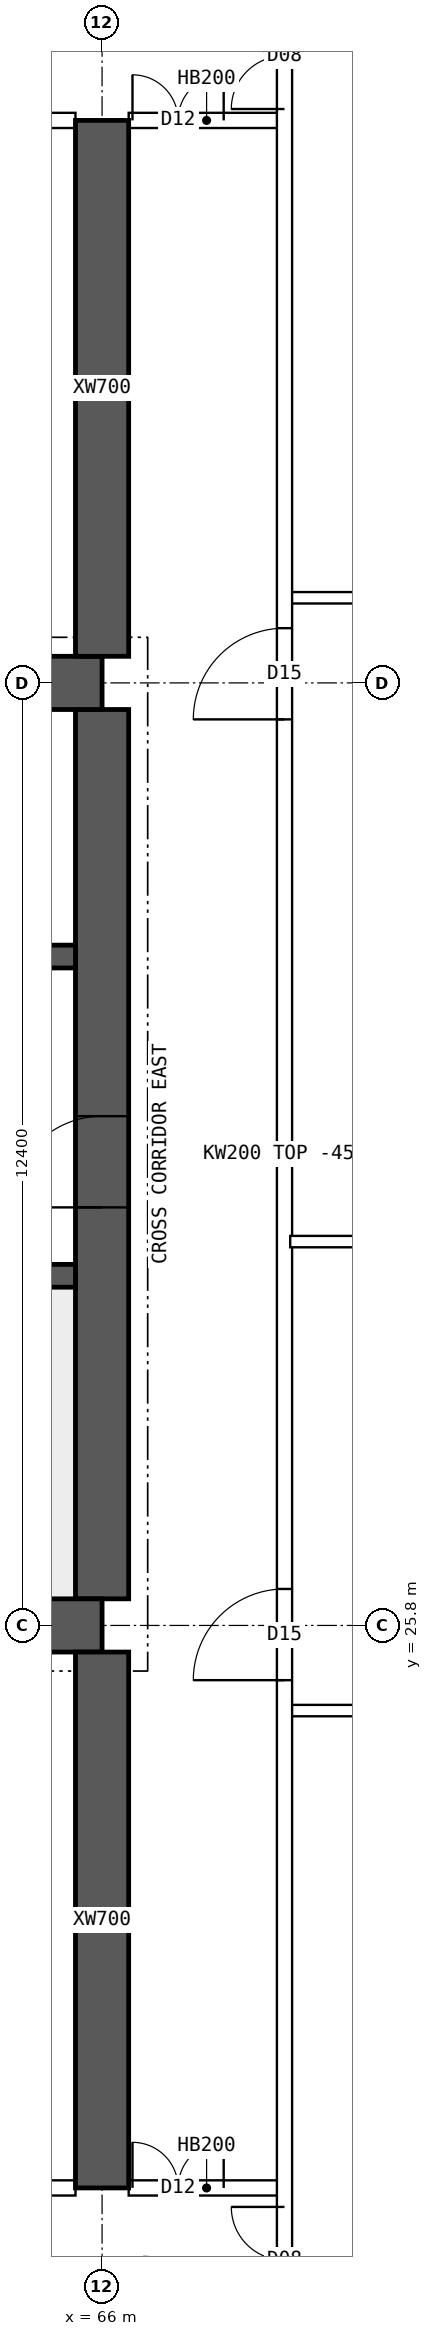
"""IFC4 building model, lengths in metres.
Left out: names, types, materials, properties, quantities, classifications, styles, units other than length and angle.
Written with IfcOpenShell. Run it as: python <this file> out.ifc"""

import sys

from ifc_helpers import new_model, si_unit, direction, frame, frame_2d, origin, place, context, subcontext, project, spatial, polyline, rectangle, outline, extrude, element, fill, save


model = new_model("IFC4")
c1 = context("Model", 3, precision=1e-05, world=origin(), true_north=direction((0.0, 1.0)))
c2 = subcontext(c1, "Body", "Model", "MODEL_VIEW")
j1 = project(units=[si_unit("LENGTHUNIT", "METRE"), si_unit("PLANEANGLEUNIT", "RADIAN")], contexts=[c1])
p1 = place(None, origin())
s1 = spatial("IfcSite", under=j1, at=p1, CompositionType="ELEMENT")
p2 = place(p1, origin())
s2 = spatial("IfcBuilding", under=s1, at=p2, CompositionType="ELEMENT")
p3 = place(p2, frame((0.0, 0.0, 212.8)))
s3 = spatial("IfcBuildingStorey", under=s2, at=p3, CompositionType="ELEMENT", Elevation=212.8)
for number, where, z_axis, x_axis in (
    (1, (18.0, 25.8, 0.0), (0.0, 0.0, 1.0), (1.0, 0.0, 0.0)),
    (2, (18.0, 38.2, 0.0), (0.0, 0.0, 1.0), (1.0, 0.0, 0.0)),
):
    element("IfcWall", number, at=place(p3, frame(where, z_axis=z_axis, x_axis=x_axis)), inside=s3, PredefinedType="SHEAR", context=c2, shape_type="SweptSolid", body=[
        extrude(rectangle(XDim=48.0, YDim=0.7, at=frame_2d((24.0, 0.0))), origin(), (0.0, 0.0, 1.0), 3.75),
    ])
p4 = place(p3, frame((66.0, 26.15, 0.0), z_axis=(0.0, 0.0, 1.0), x_axis=(0.0, 1.0, 0.0)))
e3 = element("IfcWall", 3, at=p4, inside=s3, PredefinedType="SHEAR", context=c2, shape_type="SweptSolid", body=[
    extrude(rectangle(XDim=11.7, YDim=0.7, at=frame_2d((5.85, 0.0))), origin(), (0.0, 0.0, 1.0), 3.75),
])
p5 = place(p4, frame((5.15, 0.0, 0.0)))
e4 = element("IfcOpeningElement", 4, at=p5, cuts=e3, PredefinedType="OPENING", context=c2, shape_type="SweptSolid", body=[
    extrude(rectangle(XDim=1.2, YDim=2.1, at=frame_2d((0.6, 1.05))), frame((0.0, 0.36, 0.0), z_axis=(0.0, -1.0, 0.0), x_axis=(1.0, 0.0, 0.0)), (0.0, 0.0, 1.0), 0.72),
])
p6 = place(p3, frame((18.35, 30.4, 0.0), z_axis=(0.0, 0.0, 1.0), x_axis=(1.0, 0.0, 0.0)))
e5 = element("IfcWall", 5, at=p6, inside=s3, PredefinedType="SHEAR", context=c2, shape_type="SweptSolid", body=[
    extrude(rectangle(XDim=47.3, YDim=0.3, at=frame_2d((23.65, 0.0))), origin(), (0.0, 0.0, 1.0), 3.75),
])
p7 = place(p6, frame((0.4, 0.0, 0.0)))
e6 = element("IfcOpeningElement", 6, at=p7, cuts=e5, PredefinedType="OPENING", context=c2, shape_type="SweptSolid", body=[
    extrude(rectangle(XDim=1.0, YDim=2.1, at=frame_2d((0.5, 1.05))), frame((0.0, 0.16, 0.0), z_axis=(0.0, -1.0, 0.0), x_axis=(1.0, 0.0, 0.0)), (0.0, 0.0, 1.0), 0.32),
])
p8 = place(p6, frame((45.9, 0.0, 0.0)))
e7 = element("IfcOpeningElement", 7, at=p8, cuts=e5, PredefinedType="OPENING", context=c2, shape_type="SweptSolid", body=[
    extrude(rectangle(XDim=1.0, YDim=2.1, at=frame_2d((0.5, 1.05))), frame((0.0, 0.16, 0.0), z_axis=(0.0, -1.0, 0.0), x_axis=(1.0, 0.0, 0.0)), (0.0, 0.0, 1.0), 0.32),
])
p9 = place(p6, frame((8.4, 0.0, 0.0)))
e8 = element("IfcOpeningElement", 8, at=p9, cuts=e5, PredefinedType="OPENING", context=c2, shape_type="SweptSolid", body=[
    extrude(rectangle(XDim=1.1, YDim=2.1, at=frame_2d((0.55, 1.05))), frame((0.0, 0.16, 0.0), z_axis=(0.0, -1.0, 0.0), x_axis=(1.0, 0.0, 0.0)), (0.0, 0.0, 1.0), 0.32),
])
p10 = place(p6, frame((11.0, 0.0, 0.0)))
e9 = element("IfcOpeningElement", 9, at=p10, cuts=e5, PredefinedType="OPENING", context=c2, shape_type="SweptSolid", body=[
    extrude(rectangle(XDim=1.1, YDim=2.1, at=frame_2d((0.55, 1.05))), frame((0.0, 0.16, 0.0), z_axis=(0.0, -1.0, 0.0), x_axis=(1.0, 0.0, 0.0)), (0.0, 0.0, 1.0), 0.32),
])
p11 = place(p6, frame((13.6, 0.0, 0.0)))
e10 = element("IfcOpeningElement", 10, at=p11, cuts=e5, PredefinedType="OPENING", context=c2, shape_type="SweptSolid", body=[
    extrude(rectangle(XDim=1.1, YDim=2.1, at=frame_2d((0.55, 1.05))), frame((0.0, 0.16, 0.0), z_axis=(0.0, -1.0, 0.0), x_axis=(1.0, 0.0, 0.0)), (0.0, 0.0, 1.0), 0.32),
])
p12 = place(p6, frame((16.2, 0.0, 0.0)))
e11 = element("IfcOpeningElement", 11, at=p12, cuts=e5, PredefinedType="OPENING", context=c2, shape_type="SweptSolid", body=[
    extrude(rectangle(XDim=1.1, YDim=2.1, at=frame_2d((0.55, 1.05))), frame((0.0, 0.16, 0.0), z_axis=(0.0, -1.0, 0.0), x_axis=(1.0, 0.0, 0.0)), (0.0, 0.0, 1.0), 0.32),
])
p13 = place(p6, frame((18.975, 0.0, 0.0)))
e12 = element("IfcOpeningElement", 12, at=p13, cuts=e5, PredefinedType="OPENING", context=c2, shape_type="SweptSolid", body=[
    extrude(rectangle(XDim=0.9, YDim=2.1, at=frame_2d((0.45, 1.05))), frame((0.0, 0.16, 0.0), z_axis=(0.0, -1.0, 0.0), x_axis=(1.0, 0.0, 0.0)), (0.0, 0.0, 1.0), 0.32),
])
p14 = place(p6, frame((30.267, 0.0, 0.0)))
e13 = element("IfcOpeningElement", 13, at=p14, cuts=e5, PredefinedType="OPENING", context=c2, shape_type="SweptSolid", body=[
    extrude(rectangle(XDim=1.1, YDim=2.1, at=frame_2d((0.55, 1.05))), frame((0.0, 0.16, 0.0), z_axis=(0.0, -1.0, 0.0), x_axis=(1.0, 0.0, 0.0)), (0.0, 0.0, 1.0), 0.32),
])
p15 = place(p6, frame((33.8, 0.0, 0.0)))
e14 = element("IfcOpeningElement", 14, at=p15, cuts=e5, PredefinedType="OPENING", context=c2, shape_type="SweptSolid", body=[
    extrude(rectangle(XDim=1.1, YDim=2.1, at=frame_2d((0.55, 1.05))), frame((0.0, 0.16, 0.0), z_axis=(0.0, -1.0, 0.0), x_axis=(1.0, 0.0, 0.0)), (0.0, 0.0, 1.0), 0.32),
])
p16 = place(p6, frame((37.333, 0.0, 0.0)))
e15 = element("IfcOpeningElement", 15, at=p16, cuts=e5, PredefinedType="OPENING", context=c2, shape_type="SweptSolid", body=[
    extrude(rectangle(XDim=1.1, YDim=2.1, at=frame_2d((0.55, 1.05))), frame((0.0, 0.16, 0.0), z_axis=(0.0, -1.0, 0.0), x_axis=(1.0, 0.0, 0.0)), (0.0, 0.0, 1.0), 0.32),
])
p17 = place(p3, frame((18.35, 34.6, 0.0), z_axis=(0.0, 0.0, 1.0), x_axis=(1.0, 0.0, 0.0)))
e16 = element("IfcWall", 16, at=p17, inside=s3, PredefinedType="SHEAR", context=c2, shape_type="SweptSolid", body=[
    extrude(rectangle(XDim=47.3, YDim=0.3, at=frame_2d((23.65, 0.0))), origin(), (0.0, 0.0, 1.0), 3.75),
])
p18 = place(p17, frame((0.9, 0.0, 0.0)))
e17 = element("IfcOpeningElement", 17, at=p18, cuts=e16, PredefinedType="OPENING", context=c2, shape_type="SweptSolid", body=[
    extrude(rectangle(XDim=1.1, YDim=2.1, at=frame_2d((0.55, 1.05))), frame((0.0, 0.16, 0.0), z_axis=(0.0, -1.0, 0.0), x_axis=(1.0, 0.0, 0.0)), (0.0, 0.0, 1.0), 0.32),
])
p19 = place(p17, frame((45.3, 0.0, 0.0)))
e18 = element("IfcOpeningElement", 18, at=p19, cuts=e16, PredefinedType="OPENING", context=c2, shape_type="SweptSolid", body=[
    extrude(rectangle(XDim=1.1, YDim=2.1, at=frame_2d((0.55, 1.05))), frame((0.0, 0.16, 0.0), z_axis=(0.0, -1.0, 0.0), x_axis=(1.0, 0.0, 0.0)), (0.0, 0.0, 1.0), 0.32),
])
p20 = place(p17, frame((4.25, 0.0, 0.0)))
e19 = element("IfcOpeningElement", 19, at=p20, cuts=e16, PredefinedType="OPENING", context=c2, shape_type="SweptSolid", body=[
    extrude(rectangle(XDim=0.9, YDim=2.1, at=frame_2d((0.45, 1.05))), frame((0.0, 0.16, 0.0), z_axis=(0.0, -1.0, 0.0), x_axis=(1.0, 0.0, 0.0)), (0.0, 0.0, 1.0), 0.32),
])
p21 = place(p17, frame((42.15, 0.0, 0.0)))
e20 = element("IfcOpeningElement", 20, at=p21, cuts=e16, PredefinedType="OPENING", context=c2, shape_type="SweptSolid", body=[
    extrude(rectangle(XDim=0.9, YDim=2.1, at=frame_2d((0.45, 1.05))), frame((0.0, 0.16, 0.0), z_axis=(0.0, -1.0, 0.0), x_axis=(1.0, 0.0, 0.0)), (0.0, 0.0, 1.0), 0.32),
])
p22 = place(p17, frame((9.025, 0.0, 0.0)))
e21 = element("IfcOpeningElement", 21, at=p22, cuts=e16, PredefinedType="OPENING", context=c2, shape_type="SweptSolid", body=[
    extrude(rectangle(XDim=0.9, YDim=2.1, at=frame_2d((0.45, 1.05))), frame((0.0, 0.16, 0.0), z_axis=(0.0, -1.0, 0.0), x_axis=(1.0, 0.0, 0.0)), (0.0, 0.0, 1.0), 0.32),
])
p23 = place(p17, frame((12.999, 0.0, 0.0)))
e22 = element("IfcOpeningElement", 22, at=p23, cuts=e16, PredefinedType="OPENING", context=c2, shape_type="SweptSolid", body=[
    extrude(rectangle(XDim=0.9, YDim=2.1, at=frame_2d((0.45, 1.05))), frame((0.0, 0.16, 0.0), z_axis=(0.0, -1.0, 0.0), x_axis=(1.0, 0.0, 0.0)), (0.0, 0.0, 1.0), 0.32),
])
p24 = place(p17, frame((16.646, 0.0, 0.0)))
e23 = element("IfcOpeningElement", 23, at=p24, cuts=e16, PredefinedType="OPENING", context=c2, shape_type="SweptSolid", body=[
    extrude(rectangle(XDim=0.9, YDim=2.1, at=frame_2d((0.45, 1.05))), frame((0.0, 0.16, 0.0), z_axis=(0.0, -1.0, 0.0), x_axis=(1.0, 0.0, 0.0)), (0.0, 0.0, 1.0), 0.32),
])
p25 = place(p17, frame((20.405, 0.0, 0.0)))
e24 = element("IfcOpeningElement", 24, at=p25, cuts=e16, PredefinedType="OPENING", context=c2, shape_type="SweptSolid", body=[
    extrude(rectangle(XDim=0.9, YDim=2.1, at=frame_2d((0.45, 1.05))), frame((0.0, 0.16, 0.0), z_axis=(0.0, -1.0, 0.0), x_axis=(1.0, 0.0, 0.0)), (0.0, 0.0, 1.0), 0.32),
])
p26 = place(p17, frame((24.811, 0.0, 0.0)))
e25 = element("IfcOpeningElement", 25, at=p26, cuts=e16, PredefinedType="OPENING", context=c2, shape_type="SweptSolid", body=[
    extrude(rectangle(XDim=0.9, YDim=2.1, at=frame_2d((0.45, 1.05))), frame((0.0, 0.16, 0.0), z_axis=(0.0, -1.0, 0.0), x_axis=(1.0, 0.0, 0.0)), (0.0, 0.0, 1.0), 0.32),
])
p27 = place(p17, frame((27.608, 0.0, 0.0)))
e26 = element("IfcOpeningElement", 26, at=p27, cuts=e16, PredefinedType="OPENING", context=c2, shape_type="SweptSolid", body=[
    extrude(rectangle(XDim=0.9, YDim=2.1, at=frame_2d((0.45, 1.05))), frame((0.0, 0.16, 0.0), z_axis=(0.0, -1.0, 0.0), x_axis=(1.0, 0.0, 0.0)), (0.0, 0.0, 1.0), 0.32),
])
p28 = place(p17, frame((29.981, 0.0, 0.0)))
e27 = element("IfcOpeningElement", 27, at=p28, cuts=e16, PredefinedType="OPENING", context=c2, shape_type="SweptSolid", body=[
    extrude(rectangle(XDim=0.9, YDim=2.1, at=frame_2d((0.45, 1.05))), frame((0.0, 0.16, 0.0), z_axis=(0.0, -1.0, 0.0), x_axis=(1.0, 0.0, 0.0)), (0.0, 0.0, 1.0), 0.32),
])
p29 = place(p17, frame((33.831, 0.0, 0.0)))
e28 = element("IfcOpeningElement", 28, at=p29, cuts=e16, PredefinedType="OPENING", context=c2, shape_type="SweptSolid", body=[
    extrude(rectangle(XDim=0.9, YDim=2.1, at=frame_2d((0.45, 1.05))), frame((0.0, 0.16, 0.0), z_axis=(0.0, -1.0, 0.0), x_axis=(1.0, 0.0, 0.0)), (0.0, 0.0, 1.0), 0.32),
])
p30 = place(p17, frame((37.579, 0.0, 0.0)))
e29 = element("IfcOpeningElement", 29, at=p30, cuts=e16, PredefinedType="OPENING", context=c2, shape_type="SweptSolid", body=[
    extrude(rectangle(XDim=0.9, YDim=2.1, at=frame_2d((0.45, 1.05))), frame((0.0, 0.16, 0.0), z_axis=(0.0, -1.0, 0.0), x_axis=(1.0, 0.0, 0.0)), (0.0, 0.0, 1.0), 0.32),
])
for number, where, z_axis, x_axis in (
    (30, (66.0, 18.4, 0.0), (0.0, 0.0, 1.0), (0.0, 1.0, 0.0)),
    (31, (66.0, 38.55, 0.0), (0.0, 0.0, 1.0), (0.0, 1.0, 0.0)),
):
    element("IfcWall", number, at=place(p3, frame(where, z_axis=z_axis, x_axis=x_axis)), inside=s3, PredefinedType="SHEAR", context=c2, shape_type="SweptSolid", body=[
        extrude(rectangle(XDim=7.05, YDim=0.7, at=frame_2d((3.525, 0.0))), origin(), (0.0, 0.0, 1.0), 3.75),
    ])
p31 = place(p3, frame((60.35, 18.4, 0.0), z_axis=(0.0, 0.0, 1.0), x_axis=(1.0, 0.0, 0.0)))
e32 = element("IfcWall", 32, at=p31, inside=s3, PredefinedType="SOLIDWALL", context=c2, shape_type="SweptSolid", body=[
    extrude(rectangle(XDim=5.3, YDim=0.2, at=frame_2d((2.65, 0.0))), origin(), (0.0, 0.0, 1.0), 3.3),
])
p32 = place(p31, frame((0.15, 0.0, 0.0)))
e33 = element("IfcOpeningElement", 33, at=p32, cuts=e32, PredefinedType="OPENING", context=c2, shape_type="SweptSolid", body=[
    extrude(rectangle(XDim=0.9, YDim=2.1, at=frame_2d((0.45, 1.05))), frame((0.0, 0.11, 0.0), z_axis=(0.0, -1.0, 0.0), x_axis=(1.0, 0.0, 0.0)), (0.0, 0.0, 1.0), 0.22),
])
p33 = place(p31, frame((2.29, 0.0, 0.0)))
e34 = element("IfcOpeningElement", 34, at=p33, cuts=e32, PredefinedType="OPENING", context=c2, shape_type="SweptSolid", body=[
    extrude(rectangle(XDim=0.9, YDim=2.1, at=frame_2d((0.45, 1.05))), frame((0.0, 0.11, 0.0), z_axis=(0.0, -1.0, 0.0), x_axis=(1.0, 0.0, 0.0)), (0.0, 0.0, 1.0), 0.22),
])
p34 = place(p3, frame((66.35, 18.4, 0.0), z_axis=(0.0, 0.0, 1.0), x_axis=(1.0, 0.0, 0.0)))
e35 = element("IfcWall", 35, at=p34, inside=s3, PredefinedType="SOLIDWALL", context=c2, shape_type="SweptSolid", body=[
    extrude(rectangle(XDim=2.05, YDim=0.2, at=frame_2d((1.025, 0.0))), origin(), (0.0, 0.0, 1.0), 3.3),
])
p35 = place(p34, frame((0.05, 0.0, 0.0)))
e36 = element("IfcOpeningElement", 36, at=p35, cuts=e35, PredefinedType="OPENING", context=c2, shape_type="SweptSolid", body=[
    extrude(rectangle(XDim=1.2, YDim=2.1, at=frame_2d((0.6, 1.05))), frame((0.0, 0.11, 0.0), z_axis=(0.0, -1.0, 0.0), x_axis=(1.0, 0.0, 0.0)), (0.0, 0.0, 1.0), 0.22),
])
p36 = place(p3, frame((60.35, 45.6, 0.0), z_axis=(0.0, 0.0, 1.0), x_axis=(1.0, 0.0, 0.0)))
e37 = element("IfcWall", 37, at=p36, inside=s3, PredefinedType="SOLIDWALL", context=c2, shape_type="SweptSolid", body=[
    extrude(rectangle(XDim=5.3, YDim=0.2, at=frame_2d((2.65, 0.0))), origin(), (0.0, 0.0, 1.0), 3.3),
])
p37 = place(p36, frame((0.15, 0.0, 0.0)))
e38 = element("IfcOpeningElement", 38, at=p37, cuts=e37, PredefinedType="OPENING", context=c2, shape_type="SweptSolid", body=[
    extrude(rectangle(XDim=0.9, YDim=2.1, at=frame_2d((0.45, 1.05))), frame((0.0, 0.11, 0.0), z_axis=(0.0, -1.0, 0.0), x_axis=(1.0, 0.0, 0.0)), (0.0, 0.0, 1.0), 0.22),
])
p38 = place(p36, frame((3.635, 0.0, 0.0)))
e39 = element("IfcOpeningElement", 39, at=p38, cuts=e37, PredefinedType="OPENING", context=c2, shape_type="SweptSolid", body=[
    extrude(rectangle(XDim=0.9, YDim=2.1, at=frame_2d((0.45, 1.05))), frame((0.0, 0.11, 0.0), z_axis=(0.0, -1.0, 0.0), x_axis=(1.0, 0.0, 0.0)), (0.0, 0.0, 1.0), 0.22),
])
p39 = place(p3, frame((66.35, 45.6, 0.0), z_axis=(0.0, 0.0, 1.0), x_axis=(1.0, 0.0, 0.0)))
e40 = element("IfcWall", 40, at=p39, inside=s3, PredefinedType="SOLIDWALL", context=c2, shape_type="SweptSolid", body=[
    extrude(rectangle(XDim=2.05, YDim=0.2, at=frame_2d((1.025, 0.0))), origin(), (0.0, 0.0, 1.0), 3.3),
])
p40 = place(p39, frame((0.05, 0.0, 0.0)))
e41 = element("IfcOpeningElement", 41, at=p40, cuts=e40, PredefinedType="OPENING", context=c2, shape_type="SweptSolid", body=[
    extrude(rectangle(XDim=1.2, YDim=2.1, at=frame_2d((0.6, 1.05))), frame((0.0, 0.11, 0.0), z_axis=(0.0, -1.0, 0.0), x_axis=(1.0, 0.0, 0.0)), (0.0, 0.0, 1.0), 0.22),
])
p41 = place(p3, frame((68.475, 30.85, 0.0), z_axis=(0.0, 0.0, 1.0), x_axis=(1.0, 0.0, 0.0)))
e42 = element("IfcWall", 42, at=p41, inside=s3, PredefinedType="PARTITIONING", context=c2, shape_type="SweptSolid", body=[
    extrude(outline(polyline([(0.0, 0.0), (6.82, 0.0), (6.82, 3.3), (3.827, 3.3), (3.825, 2.85), (3.227, 2.85), (3.225, 3.3), (0.0, 3.3), (0.0, 0.0)])), frame((0.0, 0.075, 0.0), z_axis=(0.0, -1.0, 0.0), x_axis=(1.0, 0.0, 0.0)), (0.0, 0.0, 1.0), 0.15),
])
p42 = place(p3, frame((68.4, 11.646, 0.0), z_axis=(0.0, 0.0, 1.0), x_axis=(0.0, 1.0, 0.0)))
e43 = element("IfcWall", 43, at=p42, inside=s3, PredefinedType="SOLIDWALL", context=c2, shape_type="SweptSolid", body=[
    extrude(rectangle(XDim=40.708, YDim=0.2, at=frame_2d((20.354, 0.0))), origin(), (0.0, 0.0, 1.0), 3.3),
])
p43 = place(p42, frame((13.434, 0.0, 0.0)))
e44 = element("IfcOpeningElement", 44, at=p43, cuts=e43, PredefinedType="OPENING", context=c2, shape_type="SweptSolid", body=[
    extrude(rectangle(XDim=1.2, YDim=2.1, at=frame_2d((0.6, 1.05))), frame((0.0, 0.11, 0.0), z_axis=(0.0, -1.0, 0.0), x_axis=(1.0, 0.0, 0.0)), (0.0, 0.0, 1.0), 0.22),
])
p44 = place(p42, frame((26.074, 0.0, 0.0)))
e45 = element("IfcOpeningElement", 45, at=p44, cuts=e43, PredefinedType="OPENING", context=c2, shape_type="SweptSolid", body=[
    extrude(rectangle(XDim=1.2, YDim=2.1, at=frame_2d((0.6, 1.05))), frame((0.0, 0.11, 0.0), z_axis=(0.0, -1.0, 0.0), x_axis=(1.0, 0.0, 0.0)), (0.0, 0.0, 1.0), 0.22),
])
p45 = place(p42, frame((5.104, 0.0, 0.0)))
e46 = element("IfcOpeningElement", 46, at=p45, cuts=e43, PredefinedType="OPENING", context=c2, shape_type="SweptSolid", body=[
    extrude(rectangle(XDim=1.4, YDim=2.1, at=frame_2d((0.7, 1.05))), frame((0.0, 0.11, 0.0), z_axis=(0.0, -1.0, 0.0), x_axis=(1.0, 0.0, 0.0)), (0.0, 0.0, 1.0), 0.22),
])
p46 = place(p42, frame((34.104, 0.0, 0.0)))
e47 = element("IfcOpeningElement", 47, at=p46, cuts=e43, PredefinedType="OPENING", context=c2, shape_type="SweptSolid", body=[
    extrude(rectangle(XDim=1.4, YDim=2.1, at=frame_2d((0.7, 1.05))), frame((0.0, 0.11, 0.0), z_axis=(0.0, -1.0, 0.0), x_axis=(1.0, 0.0, 0.0)), (0.0, 0.0, 1.0), 0.22),
])
for number, where, z_axis, x_axis in (
    (48, (68.475, 24.68, 0.0), (0.0, 0.0, 1.0), (1.0, 0.0, 0.0)),
    (49, (68.475, 39.32, 0.0), (0.0, 0.0, 1.0), (1.0, 0.0, 0.0)),
):
    element("IfcWall", number, at=place(p3, frame(where, z_axis=z_axis, x_axis=x_axis)), inside=s3, PredefinedType="PARTITIONING", context=c2, shape_type="SweptSolid", body=[
        extrude(rectangle(XDim=6.82, YDim=0.15, at=frame_2d((3.41, 0.0))), origin(), (0.0, 0.0, 1.0), 3.3),
    ])
p47 = place(p5, origin())
e50 = element("IfcDoor", 50, at=p47, inside=s3, OperationType="SINGLE_SWING_LEFT", PredefinedType="DOOR", context=c2, shape_type="SweptSolid", body=[
    extrude(rectangle(XDim=1.2, YDim=2.1, at=frame_2d((0.6, 1.05))), frame((0.0, 0.025, 0.0), z_axis=(0.0, -1.0, 0.0), x_axis=(1.0, 0.0, 0.0)), (0.0, 0.0, 1.0), 0.05),
])
fill(e4, e50)
p48 = place(p35, origin())
e51 = element("IfcDoor", 51, at=p48, inside=s3, OperationType="DOUBLE_DOOR_SINGLE_SWING", PredefinedType="DOOR", context=c2, shape_type="SweptSolid", body=[
    extrude(rectangle(XDim=1.2, YDim=2.1, at=frame_2d((0.6, 1.05))), frame((0.0, 0.025, 0.0), z_axis=(0.0, -1.0, 0.0), x_axis=(1.0, 0.0, 0.0)), (0.0, 0.0, 1.0), 0.05),
])
fill(e36, e51)
p49 = place(p40, origin())
e52 = element("IfcDoor", 52, at=p49, inside=s3, OperationType="DOUBLE_DOOR_SINGLE_SWING", PredefinedType="DOOR", context=c2, shape_type="SweptSolid", body=[
    extrude(rectangle(XDim=1.2, YDim=2.1, at=frame_2d((0.6, 1.05))), frame((0.0, 0.025, 0.0), z_axis=(0.0, -1.0, 0.0), x_axis=(1.0, 0.0, 0.0)), (0.0, 0.0, 1.0), 0.05),
])
fill(e41, e52)
p50 = place(p43, origin())
e53 = element("IfcDoor", 53, at=p50, inside=s3, OperationType="SINGLE_SWING_LEFT", PredefinedType="DOOR", context=c2, shape_type="SweptSolid", body=[
    extrude(rectangle(XDim=1.2, YDim=2.1, at=frame_2d((0.6, 1.05))), frame((0.0, 0.025, 0.0), z_axis=(0.0, -1.0, 0.0), x_axis=(1.0, 0.0, 0.0)), (0.0, 0.0, 1.0), 0.05),
])
fill(e44, e53)
p51 = place(p44, origin())
e54 = element("IfcDoor", 54, at=p51, inside=s3, OperationType="SINGLE_SWING_LEFT", PredefinedType="DOOR", context=c2, shape_type="SweptSolid", body=[
    extrude(rectangle(XDim=1.2, YDim=2.1, at=frame_2d((0.6, 1.05))), frame((0.0, 0.025, 0.0), z_axis=(0.0, -1.0, 0.0), x_axis=(1.0, 0.0, 0.0)), (0.0, 0.0, 1.0), 0.05),
])
fill(e45, e54)
p52 = place(p45, origin())
e55 = element("IfcDoor", 55, at=p52, inside=s3, OperationType="DOUBLE_DOOR_SINGLE_SWING", PredefinedType="DOOR", context=c2, shape_type="SweptSolid", body=[
    extrude(rectangle(XDim=1.4, YDim=2.1, at=frame_2d((0.7, 1.05))), frame((0.0, 0.025, 0.0), z_axis=(0.0, -1.0, 0.0), x_axis=(1.0, 0.0, 0.0)), (0.0, 0.0, 1.0), 0.05),
])
fill(e46, e55)
p53 = place(p46, origin())
e56 = element("IfcDoor", 56, at=p53, inside=s3, OperationType="DOUBLE_DOOR_SINGLE_SWING", PredefinedType="DOOR", context=c2, shape_type="SweptSolid", body=[
    extrude(rectangle(XDim=1.4, YDim=2.1, at=frame_2d((0.7, 1.05))), frame((0.0, 0.025, 0.0), z_axis=(0.0, -1.0, 0.0), x_axis=(1.0, 0.0, 0.0)), (0.0, 0.0, 1.0), 0.05),
])
fill(e47, e56)
save(model, sys.argv[1])
